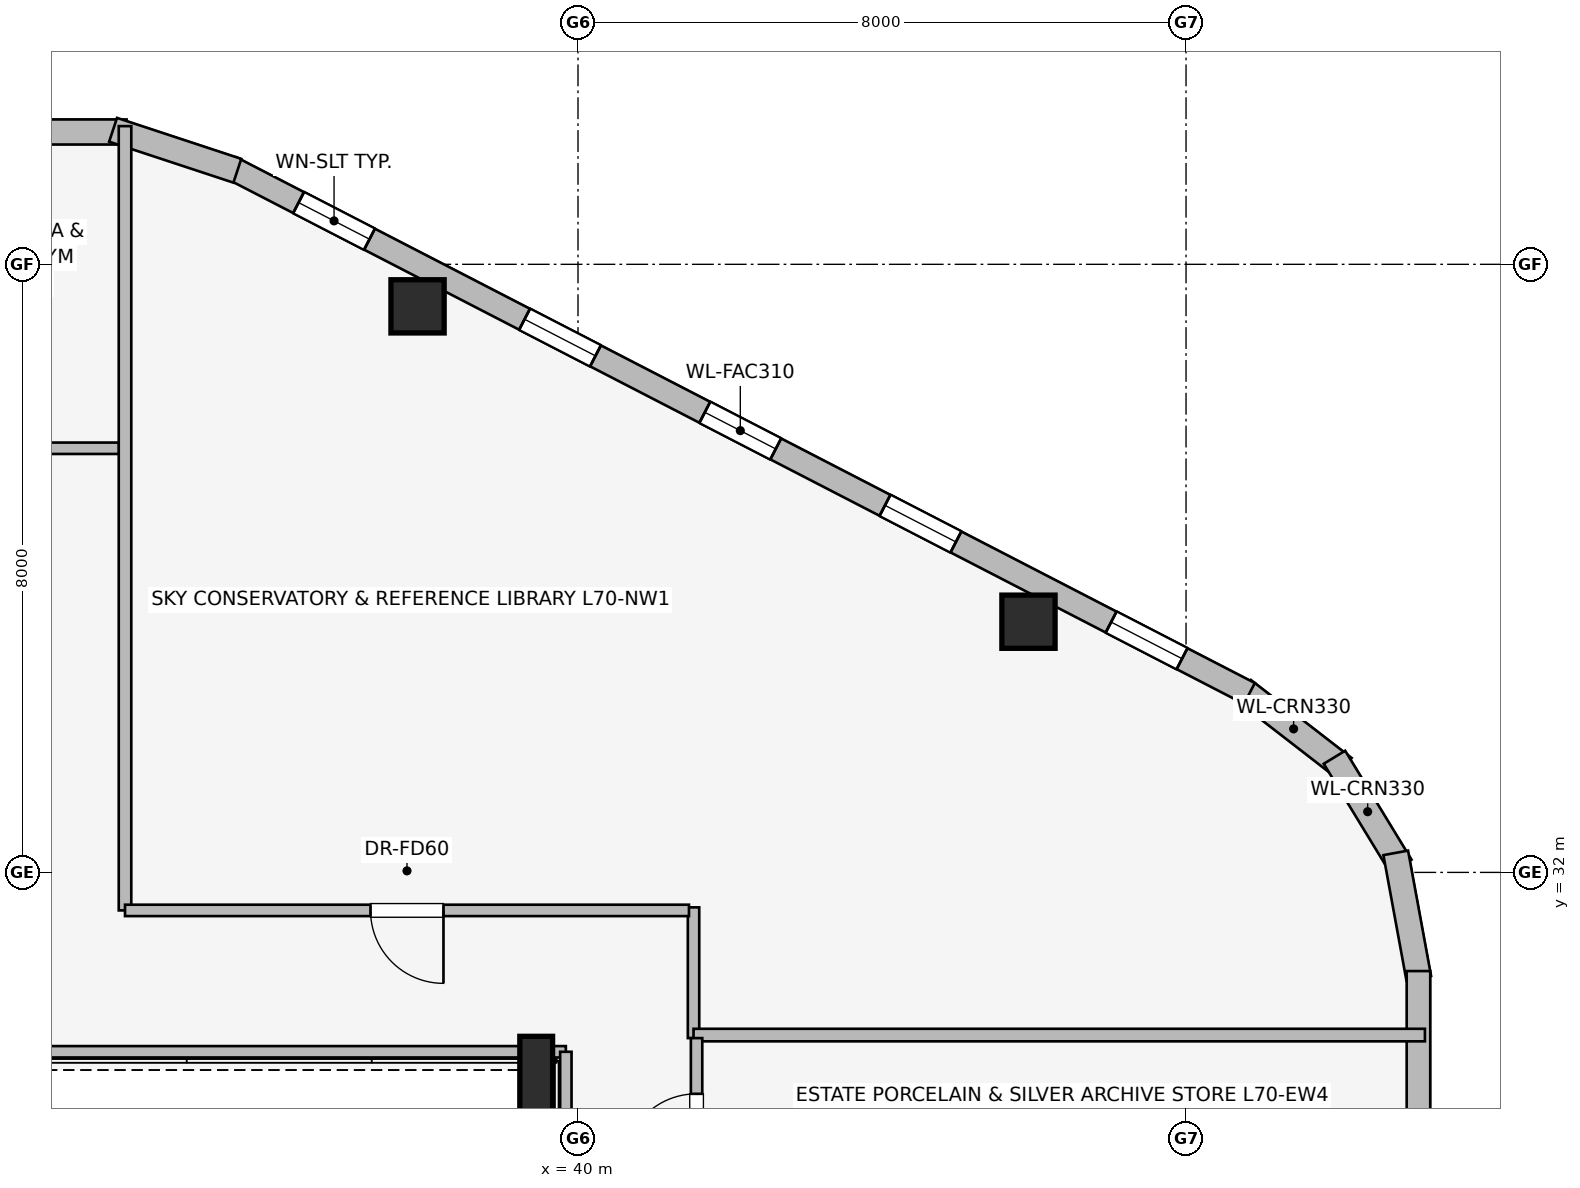
"""IFC4 building model, lengths in metres.
Left out: names, types, materials, properties, quantities, classifications, styles, units other than length and angle.
Written with IfcOpenShell. Run it as: python <this file> out.ifc"""

import sys

from ifc_helpers import new_model, si_unit, direction, frame, frame_2d, origin, origin_2d, place, context, subcontext, project, spatial, rectangle, i_section, extrude, element, fill, save


model = new_model("IFC4")
c1 = context("Model", 3, precision=1e-05, world=origin(), true_north=direction((0.0, 1.0)))
c2 = subcontext(c1, "Body", "Model", "MODEL_VIEW")
j1 = project(units=[si_unit("LENGTHUNIT", "METRE"), si_unit("PLANEANGLEUNIT", "RADIAN")], contexts=[c1])
p1 = place(None, origin())
s1 = spatial("IfcSite", under=j1, at=p1, CompositionType="ELEMENT")
p2 = place(p1, origin())
s2 = spatial("IfcBuilding", under=s1, at=p2, CompositionType="ELEMENT")
p3 = place(p2, frame((0.0, 0.0, 256.1)))
s3 = spatial("IfcBuildingStorey", under=s2, at=p3, CompositionType="ELEMENT", Elevation=256.1)
for number, where, z_axis, x_axis in (
    (1, (45.927, 35.298, 0.0), (0.0, 0.0, 1.0), (1.0, 0.0, 0.0)),
    (2, (37.889, 39.447, 0.0), (0.0, 0.0, 1.0), (1.0, 0.0, 0.0)),
):
    element("IfcColumn", number, at=place(p3, frame(where, z_axis=z_axis, x_axis=x_axis)), inside=s3, PredefinedType="COLUMN", context=c2, shape_type="SweptSolid", body=[
        extrude(rectangle(XDim=0.7, YDim=0.7, at=origin_2d()), origin(), (0.0, 0.0, 1.0), 3.55),
    ])
p4 = place(p3, frame((39.45, 29.35, 0.0), z_axis=(0.0, 0.0, 1.0), x_axis=(1.0, 0.0, 0.0)))
e3 = element("IfcColumn", 3, at=p4, inside=s3, PredefinedType="COLUMN", context=c2, shape_type="SweptSolid", body=[
    extrude(i_section(OverallWidth=0.431, OverallDepth=0.987, WebThickness=0.034, FlangeThickness=0.062, at=origin_2d()), origin(), (0.0, 0.0, 1.0), 3.55),
])
p5 = place(p3, frame((48.753, 34.401, 0.0), z_axis=(0.0, 0.0, 1.0), x_axis=(0.790691856293, -0.61221433207, 0.0)))
e4 = element("IfcWall", 4, at=p5, inside=s3, PredefinedType="STANDARD", context=c2, shape_type="SweptSolid", body=[
    extrude(rectangle(XDim=1.676, YDim=0.33, at=frame_2d((0.838, 0.0))), origin(), (0.0, 0.0, 1.0), 3.29),
])
p6 = place(p3, frame((49.953, 33.515, 0.0), z_axis=(0.0, 0.0, 1.0), x_axis=(0.520325409202, -0.853968072318, 0.0)))
e5 = element("IfcWall", 5, at=p6, inside=s3, PredefinedType="STANDARD", context=c2, shape_type="SweptSolid", body=[
    extrude(rectangle(XDim=1.678, YDim=0.33, at=frame_2d((0.839, 0.0))), origin(), (0.0, 0.0, 1.0), 3.29),
])
p7 = place(p3, frame((50.759, 32.257, 0.0), z_axis=(0.0, 0.0, 1.0), x_axis=(0.180691763044, -0.983539773862, 0.0)))
e6 = element("IfcWall", 6, at=p7, inside=s3, PredefinedType="STANDARD", context=c2, shape_type="SweptSolid", body=[
    extrude(rectangle(XDim=1.677, YDim=0.33, at=frame_2d((0.838, 0.0))), origin(), (0.0, 0.0, 1.0), 3.29),
])
p8 = place(p3, frame((35.437, 41.27, 0.0), z_axis=(0.0, 0.0, 1.0), x_axis=(0.888581481622, -0.458718814218, 0.0)))
e7 = element("IfcWall", 7, at=p8, inside=s3, PredefinedType="STANDARD", context=c2, shape_type="SweptSolid", body=[
    extrude(rectangle(XDim=15.077, YDim=0.31, at=frame_2d((7.539, 0.0))), origin(), (0.0, 0.0, 1.0), 3.29),
])
p9 = place(p8, frame((0.998, 0.0, 0.75)))
e8 = element("IfcOpeningElement", 8, at=p9, cuts=e7, PredefinedType="OPENING", context=c2, shape_type="SweptSolid", body=[
    extrude(rectangle(XDim=1.05, YDim=1.4, at=frame_2d((0.525, 0.7))), frame((0.0, 0.165, 0.0), z_axis=(0.0, -1.0, 0.0), x_axis=(1.0, 0.0, 0.0)), (0.0, 0.0, 1.0), 0.33),
])
p10 = place(p8, frame((4.344, 0.0, 0.75)))
e9 = element("IfcOpeningElement", 9, at=p10, cuts=e7, PredefinedType="OPENING", context=c2, shape_type="SweptSolid", body=[
    extrude(rectangle(XDim=1.05, YDim=1.4, at=frame_2d((0.525, 0.7))), frame((0.0, 0.165, 0.0), z_axis=(0.0, -1.0, 0.0), x_axis=(1.0, 0.0, 0.0)), (0.0, 0.0, 1.0), 0.33),
])
p11 = place(p8, frame((7.013, 0.0, 0.75)))
e10 = element("IfcOpeningElement", 10, at=p11, cuts=e7, PredefinedType="OPENING", context=c2, shape_type="SweptSolid", body=[
    extrude(rectangle(XDim=1.05, YDim=1.4, at=frame_2d((0.525, 0.7))), frame((0.0, 0.165, 0.0), z_axis=(0.0, -1.0, 0.0), x_axis=(1.0, 0.0, 0.0)), (0.0, 0.0, 1.0), 0.33),
])
p12 = place(p8, frame((9.681, 0.0, 0.75)))
e11 = element("IfcOpeningElement", 11, at=p12, cuts=e7, PredefinedType="OPENING", context=c2, shape_type="SweptSolid", body=[
    extrude(rectangle(XDim=1.05, YDim=1.4, at=frame_2d((0.525, 0.7))), frame((0.0, 0.165, 0.0), z_axis=(0.0, -1.0, 0.0), x_axis=(1.0, 0.0, 0.0)), (0.0, 0.0, 1.0), 0.33),
])
p13 = place(p8, frame((13.029, 0.0, 0.75)))
e12 = element("IfcOpeningElement", 12, at=p13, cuts=e7, PredefinedType="OPENING", context=c2, shape_type="SweptSolid", body=[
    extrude(rectangle(XDim=1.05, YDim=1.4, at=frame_2d((0.525, 0.7))), frame((0.0, 0.165, 0.0), z_axis=(0.0, -1.0, 0.0), x_axis=(1.0, 0.0, 0.0)), (0.0, 0.0, 1.0), 0.33),
])
p14 = place(p3, frame((32.339, 41.741, 0.0), z_axis=(0.0, 0.0, 1.0), x_axis=(1.0, 0.0, 0.0)))
e13 = element("IfcWall", 13, at=p14, inside=s3, PredefinedType="STANDARD", context=c2, shape_type="SweptSolid", body=[
    extrude(rectangle(XDim=1.722, YDim=0.33, at=frame_2d((0.861, 0.0))), origin(), (0.0, 0.0, 1.0), 3.29),
])
p15 = place(p3, frame((33.883, 41.77, 0.0), z_axis=(0.0, 0.0, 1.0), x_axis=(0.949713440491, -0.313120393699, 0.0)))
e14 = element("IfcWall", 14, at=p15, inside=s3, PredefinedType="STANDARD", context=c2, shape_type="SweptSolid", body=[
    extrude(rectangle(XDim=1.722, YDim=0.33, at=frame_2d((0.861, 0.0))), origin(), (0.0, 0.0, 1.0), 3.29),
])
p16 = place(p3, frame((51.058, 30.702, 0.0), z_axis=(0.0, 0.0, 1.0), x_axis=(0.0, -1.0, 0.0)))
e15 = element("IfcWall", 15, at=p16, inside=s3, PredefinedType="STANDARD", context=c2, shape_type="SweptSolid", body=[
    extrude(rectangle(XDim=13.404, YDim=0.31, at=frame_2d((6.702, 0.0))), origin(), (0.0, 0.0, 1.0), 3.29),
])
p17 = place(p16, frame((6.652, 0.0, 0.0)))
e16 = element("IfcOpeningElement", 16, at=p17, cuts=e15, PredefinedType="OPENING", context=c2, shape_type="SweptSolid", body=[
    extrude(rectangle(XDim=1.1, YDim=2.04, at=frame_2d((0.55, 1.02))), frame((0.0, 0.165, 0.0), z_axis=(0.0, -1.0, 0.0), x_axis=(1.0, 0.0, 0.0)), (0.0, 0.0, 1.0), 0.33),
])
p18 = place(p16, frame((4.402, 0.0, 0.75)))
e17 = element("IfcOpeningElement", 17, at=p18, cuts=e15, PredefinedType="OPENING", context=c2, shape_type="SweptSolid", body=[
    extrude(rectangle(XDim=1.05, YDim=1.4, at=frame_2d((0.525, 0.7))), frame((0.0, 0.165, 0.0), z_axis=(0.0, -1.0, 0.0), x_axis=(1.0, 0.0, 0.0)), (0.0, 0.0, 1.0), 0.33),
])
p19 = place(p16, frame((8.369, 0.0, 0.75)))
e18 = element("IfcOpeningElement", 18, at=p19, cuts=e15, PredefinedType="OPENING", context=c2, shape_type="SweptSolid", body=[
    extrude(rectangle(XDim=1.05, YDim=1.4, at=frame_2d((0.525, 0.7))), frame((0.0, 0.165, 0.0), z_axis=(0.0, -1.0, 0.0), x_axis=(1.0, 0.0, 0.0)), (0.0, 0.0, 1.0), 0.33),
])
p20 = place(p3, frame((39.84, 29.64, 0.0), z_axis=(0.0, 0.0, 1.0), x_axis=(-1.0, 0.0, 0.0)))
e19 = element("IfcWall", 19, at=p20, inside=s3, PredefinedType="PARTITIONING", context=c2, shape_type="SweptSolid", body=[
    extrude(rectangle(XDim=12.203, YDim=0.15, at=frame_2d((6.102, 0.0))), origin(), (0.0, 0.0, 1.0), 2.431),
])
p21 = place(p3, frame((39.84, 18.36, 0.0), z_axis=(0.0, 0.0, 1.0), x_axis=(0.0, 1.0, 0.0)))
e20 = element("IfcWall", 20, at=p21, inside=s3, PredefinedType="PARTITIONING", context=c2, shape_type="SweptSolid", body=[
    extrude(rectangle(XDim=11.28, YDim=0.15, at=frame_2d((5.64, 0.0))), origin(), (0.0, 0.0, 1.0), 3.29),
])
p22 = place(p3, frame((33.962, 37.58, 0.0), z_axis=(0.0, 0.0, 1.0), x_axis=(-1.0, 0.0, 0.0)))
e21 = element("IfcWall", 21, at=p22, inside=s3, PredefinedType="PARTITIONING", context=c2, shape_type="SweptSolid", body=[
    extrude(rectangle(XDim=3.244, YDim=0.15, at=frame_2d((1.622, 0.0))), origin(), (0.0, 0.0, 1.0), 3.29),
])
p23 = place(p22, frame((1.367, 0.0, 0.0)))
e22 = element("IfcOpeningElement", 22, at=p23, cuts=e21, PredefinedType="OPENING", context=c2, shape_type="SweptSolid", body=[
    extrude(rectangle(XDim=0.96, YDim=2.0, at=frame_2d((0.48, 1.0))), frame((0.0, 0.085, 0.0), z_axis=(0.0, -1.0, 0.0), x_axis=(1.0, 0.0, 0.0)), (0.0, 0.0, 1.0), 0.17),
])
p24 = place(p3, frame((34.04, 31.5, 0.0), z_axis=(0.0, 0.0, 1.0), x_axis=(0.0, 1.0, 0.0)))
e23 = element("IfcWall", 23, at=p24, inside=s3, PredefinedType="PARTITIONING", context=c2, shape_type="SweptSolid", body=[
    extrude(rectangle(XDim=10.318, YDim=0.165, at=frame_2d((5.159, 0.0))), origin(), (0.0, 0.0, 1.0), 3.29),
])
p25 = place(p3, frame((41.52, 29.82, 0.0), z_axis=(0.0, 0.0, 1.0), x_axis=(0.0, 1.0, 0.0)))
e24 = element("IfcWall", 24, at=p25, inside=s3, PredefinedType="PARTITIONING", context=c2, shape_type="SweptSolid", body=[
    extrude(rectangle(XDim=1.72, YDim=0.15, at=frame_2d((0.86, 0.0))), origin(), (0.0, 0.0, 1.0), 3.29),
])
p26 = place(p3, frame((41.46, 31.5, 0.0), z_axis=(0.0, 0.0, 1.0), x_axis=(-1.0, 0.0, 0.0)))
e25 = element("IfcWall", 25, at=p26, inside=s3, PredefinedType="PARTITIONING", context=c2, shape_type="SweptSolid", body=[
    extrude(rectangle(XDim=7.42, YDim=0.15, at=frame_2d((3.71, 0.0))), origin(), (0.0, 0.0, 1.0), 3.29),
])
p27 = place(p26, frame((3.23, 0.0, 0.0)))
e26 = element("IfcOpeningElement", 26, at=p27, cuts=e25, PredefinedType="OPENING", context=c2, shape_type="SweptSolid", body=[
    extrude(rectangle(XDim=0.96, YDim=2.0, at=frame_2d((0.48, 1.0))), frame((0.0, 0.085, 0.0), z_axis=(0.0, -1.0, 0.0), x_axis=(1.0, 0.0, 0.0)), (0.0, 0.0, 1.0), 0.17),
])
p28 = place(p3, frame((41.52, 29.86, 0.0), z_axis=(0.0, 0.0, 1.0), x_axis=(1.0, 0.0, 0.0)))
e27 = element("IfcWall", 27, at=p28, inside=s3, PredefinedType="PARTITIONING", context=c2, shape_type="SweptSolid", body=[
    extrude(rectangle(XDim=9.623, YDim=0.165, at=frame_2d((4.812, 0.0))), origin(), (0.0, 0.0, 1.0), 3.29),
])
p29 = place(p3, frame((41.56, 27.394, 0.0), z_axis=(0.0, 0.0, 1.0), x_axis=(0.0, 1.0, 0.0)))
e28 = element("IfcWall", 28, at=p29, inside=s3, PredefinedType="PARTITIONING", context=c2, shape_type="SweptSolid", body=[
    extrude(rectangle(XDim=2.426, YDim=0.15, at=frame_2d((1.213, 0.0))), origin(), (0.0, 0.0, 1.0), 3.29),
])
p30 = place(p29, frame((0.733, 0.0, 0.0)))
e29 = element("IfcOpeningElement", 29, at=p30, cuts=e28, PredefinedType="OPENING", context=c2, shape_type="SweptSolid", body=[
    extrude(rectangle(XDim=0.96, YDim=2.0, at=frame_2d((0.48, 1.0))), frame((0.0, 0.085, 0.0), z_axis=(0.0, -1.0, 0.0), x_axis=(1.0, 0.0, 0.0)), (0.0, 0.0, 1.0), 0.17),
])
p31 = place(p9, origin())
e30 = element("IfcWindow", 30, at=p31, inside=s3, PartitioningType="SINGLE_PANEL", PredefinedType="WINDOW", context=c2, shape_type="SweptSolid", body=[
    extrude(rectangle(XDim=1.05, YDim=1.4, at=frame_2d((0.525, 0.7))), frame((0.0, 0.03, 0.0), z_axis=(0.0, -1.0, 0.0), x_axis=(1.0, 0.0, 0.0)), (0.0, 0.0, 1.0), 0.06),
])
fill(e8, e30)
p32 = place(p10, origin())
e31 = element("IfcWindow", 31, at=p32, inside=s3, PartitioningType="SINGLE_PANEL", PredefinedType="WINDOW", context=c2, shape_type="SweptSolid", body=[
    extrude(rectangle(XDim=1.05, YDim=1.4, at=frame_2d((0.525, 0.7))), frame((0.0, 0.03, 0.0), z_axis=(0.0, -1.0, 0.0), x_axis=(1.0, 0.0, 0.0)), (0.0, 0.0, 1.0), 0.06),
])
fill(e9, e31)
p33 = place(p11, origin())
e32 = element("IfcWindow", 32, at=p33, inside=s3, PartitioningType="SINGLE_PANEL", PredefinedType="WINDOW", context=c2, shape_type="SweptSolid", body=[
    extrude(rectangle(XDim=1.05, YDim=1.4, at=frame_2d((0.525, 0.7))), frame((0.0, 0.03, 0.0), z_axis=(0.0, -1.0, 0.0), x_axis=(1.0, 0.0, 0.0)), (0.0, 0.0, 1.0), 0.06),
])
fill(e10, e32)
p34 = place(p12, origin())
e33 = element("IfcWindow", 33, at=p34, inside=s3, PartitioningType="SINGLE_PANEL", PredefinedType="WINDOW", context=c2, shape_type="SweptSolid", body=[
    extrude(rectangle(XDim=1.05, YDim=1.4, at=frame_2d((0.525, 0.7))), frame((0.0, 0.03, 0.0), z_axis=(0.0, -1.0, 0.0), x_axis=(1.0, 0.0, 0.0)), (0.0, 0.0, 1.0), 0.06),
])
fill(e11, e33)
p35 = place(p13, origin())
e34 = element("IfcWindow", 34, at=p35, inside=s3, PartitioningType="SINGLE_PANEL", PredefinedType="WINDOW", context=c2, shape_type="SweptSolid", body=[
    extrude(rectangle(XDim=1.05, YDim=1.4, at=frame_2d((0.525, 0.7))), frame((0.0, 0.03, 0.0), z_axis=(0.0, -1.0, 0.0), x_axis=(1.0, 0.0, 0.0)), (0.0, 0.0, 1.0), 0.06),
])
fill(e12, e34)
p36 = place(p27, origin())
e35 = element("IfcDoor", 35, at=p36, inside=s3, OperationType="SINGLE_SWING_LEFT", PredefinedType="DOOR", context=c2, shape_type="SweptSolid", body=[
    extrude(rectangle(XDim=0.96, YDim=2.0, at=frame_2d((0.48, 1.0))), frame((0.0, 0.025, 0.0), z_axis=(0.0, -1.0, 0.0), x_axis=(1.0, 0.0, 0.0)), (0.0, 0.0, 1.0), 0.05),
])
fill(e26, e35)
p37 = place(p30, origin())
e36 = element("IfcDoor", 36, at=p37, inside=s3, OperationType="SINGLE_SWING_LEFT", PredefinedType="DOOR", context=c2, shape_type="SweptSolid", body=[
    extrude(rectangle(XDim=0.96, YDim=2.0, at=frame_2d((0.48, 1.0))), frame((0.0, 0.025, 0.0), z_axis=(0.0, -1.0, 0.0), x_axis=(1.0, 0.0, 0.0)), (0.0, 0.0, 1.0), 0.05),
])
fill(e29, e36)
save(model, sys.argv[1])
